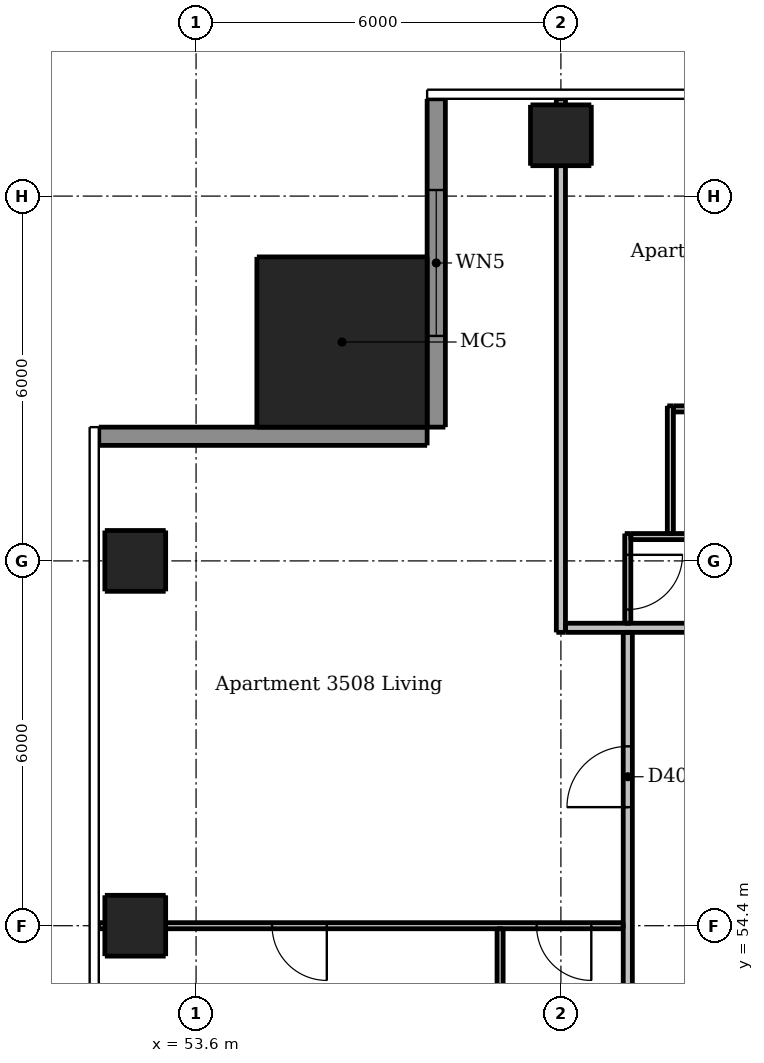
"""IFC4 building model, lengths in metres.
Left out: names, types, materials, properties, quantities, classifications, styles, units other than length and angle.
Written with IfcOpenShell. Run it as: python <this file> out.ifc"""

import sys

from ifc_helpers import new_model, si_unit, direction, frame, frame_2d, origin, origin_2d, place, context, subcontext, project, spatial, rectangle, extrude, element, fill, save


model = new_model("IFC4")
c1 = context("Model", 3, precision=1e-05, world=origin(), true_north=direction((0.0, 1.0)))
c2 = subcontext(c1, "Body", "Model", "MODEL_VIEW")
j1 = project(units=[si_unit("LENGTHUNIT", "METRE"), si_unit("PLANEANGLEUNIT", "RADIAN")], contexts=[c1])
p1 = place(None, origin())
s1 = spatial("IfcSite", under=j1, at=p1, CompositionType="ELEMENT")
p2 = place(p1, origin())
s2 = spatial("IfcBuilding", under=s1, at=p2, CompositionType="ELEMENT")
p3 = place(p2, frame((0.0, 0.0, 133.9)))
s3 = spatial("IfcBuildingStorey", under=s2, at=p3, CompositionType="ELEMENT", Elevation=133.9)
for number, where, z_axis, x_axis in (
    (1, (59.6, 67.4, 0.0), (0.0, 0.0, 1.0), (1.0, 0.0, 0.0)),
    (2, (52.6, 54.4, 0.0), (0.0, 0.0, 1.0), (1.0, 0.0, 0.0)),
    (3, (52.6, 60.4, 0.0), (0.0, 0.0, 1.0), (1.0, 0.0, 0.0)),
):
    element("IfcColumn", number, at=place(p3, frame(where, z_axis=z_axis, x_axis=x_axis)), inside=s3, PredefinedType="COLUMN", context=c2, shape_type="SweptSolid", body=[
        extrude(rectangle(XDim=1.0, YDim=1.0, at=origin_2d()), origin(), (0.0, 0.0, 1.0), 3.05),
    ])
p4 = place(p3, frame((56.0, 64.0, 0.0), z_axis=(0.0, 0.0, 1.0), x_axis=(1.0, 0.0, 0.0)))
e4 = element("IfcColumn", 4, at=p4, inside=s3, PredefinedType="COLUMN", context=c2, shape_type="SweptSolid", body=[
    extrude(rectangle(XDim=2.8, YDim=2.8, at=origin_2d()), origin(), (0.0, 0.0, 1.0), 3.3),
])
p5 = place(p3, frame((57.55, 68.0, 0.0), z_axis=(0.0, 0.0, 1.0), x_axis=(0.0, -1.0, 0.0)))
e5 = element("IfcWall", 5, at=p5, inside=s3, PredefinedType="SOLIDWALL", context=c2, shape_type="SweptSolid", body=[
    extrude(rectangle(XDim=5.4, YDim=0.3, at=frame_2d((2.7, 0.0))), origin(), (0.0, 0.0, 1.0), 3.05),
])
p6 = place(p5, frame((1.5, 0.0, 0.15)))
e6 = element("IfcOpeningElement", 6, at=p6, cuts=e5, PredefinedType="OPENING", context=c2, shape_type="SweptSolid", body=[
    extrude(rectangle(XDim=2.4, YDim=2.1, at=frame_2d((1.2, 1.05))), frame((0.0, 0.16, 0.0), z_axis=(0.0, -1.0, 0.0), x_axis=(1.0, 0.0, 0.0)), (0.0, 0.0, 1.0), 0.32),
])
p7 = place(p3, frame((57.4, 62.45, 0.0), z_axis=(0.0, 0.0, 1.0), x_axis=(-1.0, 0.0, 0.0)))
e7 = element("IfcWall", 7, at=p7, inside=s3, PredefinedType="SOLIDWALL", context=c2, shape_type="SweptSolid", body=[
    extrude(rectangle(XDim=5.4, YDim=0.3, at=frame_2d((2.7, 0.0))), origin(), (0.0, 0.0, 1.0), 3.05),
])
p8 = place(p3, frame((58.6, 54.35, 0.0), z_axis=(0.0, 0.0, 1.0), x_axis=(0.0, -1.0, 0.0)))
e8 = element("IfcWall", 8, at=p8, inside=s3, PredefinedType="PARTITIONING", context=c2, shape_type="SweptSolid", body=[
    extrude(rectangle(XDim=5.875, YDim=0.1, at=frame_2d((2.938, 0.0))), origin(), (0.0, 0.0, 1.0), 3.05),
])
p9 = place(p8, frame((3.75, 0.0, 0.0)))
e9 = element("IfcOpeningElement", 9, at=p9, cuts=e8, PredefinedType="OPENING", context=c2, shape_type="SweptSolid", body=[
    extrude(rectangle(XDim=0.8, YDim=2.1, at=frame_2d((0.4, 1.05))), frame((0.0, 0.06, 0.0), z_axis=(0.0, -1.0, 0.0), x_axis=(1.0, 0.0, 0.0)), (0.0, 0.0, 1.0), 0.12),
])
p10 = place(p3, frame((60.7, 60.85, 0.0), z_axis=(0.0, 0.0, 1.0), x_axis=(0.0, -1.0, 0.0)))
e10 = element("IfcWall", 10, at=p10, inside=s3, PredefinedType="PARTITIONING", context=c2, shape_type="SweptSolid", body=[
    extrude(rectangle(XDim=1.475, YDim=0.1, at=frame_2d((0.738, 0.0))), origin(), (0.0, 0.0, 1.0), 3.05),
])
p11 = place(p10, frame((0.35, 0.0, 0.0)))
e11 = element("IfcOpeningElement", 11, at=p11, cuts=e10, PredefinedType="OPENING", context=c2, shape_type="SweptSolid", body=[
    extrude(rectangle(XDim=0.9, YDim=2.1, at=frame_2d((0.45, 1.05))), frame((0.0, 0.06, 0.0), z_axis=(0.0, -1.0, 0.0), x_axis=(1.0, 0.0, 0.0)), (0.0, 0.0, 1.0), 0.12),
])
p12 = place(p3, frame((61.4, 60.85, 0.0), z_axis=(0.0, 0.0, 1.0), x_axis=(0.0, 1.0, 0.0)))
e12 = element("IfcWall", 12, at=p12, inside=s3, PredefinedType="PARTITIONING", context=c2, shape_type="SweptSolid", body=[
    extrude(rectangle(XDim=2.1, YDim=0.1, at=frame_2d((1.05, 0.0))), origin(), (0.0, 0.0, 1.0), 3.05),
])
p13 = place(p3, frame((61.45, 62.9, 0.0), z_axis=(0.0, 0.0, 1.0), x_axis=(1.0, 0.0, 0.0)))
e13 = element("IfcWall", 13, at=p13, inside=s3, PredefinedType="PARTITIONING", context=c2, shape_type="SweptSolid", body=[
    extrude(rectangle(XDim=6.5, YDim=0.1, at=frame_2d((3.25, 0.0))), origin(), (0.0, 0.0, 1.0), 3.05),
])
p14 = place(p3, frame((60.75, 60.8, 0.0), z_axis=(0.0, 0.0, 1.0), x_axis=(1.0, 0.0, 0.0)))
e14 = element("IfcWall", 14, at=p14, inside=s3, PredefinedType="PARTITIONING", context=c2, shape_type="SweptSolid", body=[
    extrude(rectangle(XDim=16.775, YDim=0.1, at=frame_2d((8.387, 0.0))), origin(), (0.0, 0.0, 1.0), 3.05),
])
p15 = place(p14, frame((3.2, 0.0, 0.0)))
e15 = element("IfcOpeningElement", 15, at=p15, cuts=e14, PredefinedType="OPENING", context=c2, shape_type="SweptSolid", body=[
    extrude(rectangle(XDim=0.9, YDim=2.1, at=frame_2d((0.45, 1.05))), frame((0.0, 0.06, 0.0), z_axis=(0.0, -1.0, 0.0), x_axis=(1.0, 0.0, 0.0)), (0.0, 0.0, 1.0), 0.12),
])
p16 = place(p14, frame((1.1, 0.0, 0.0)))
e16 = element("IfcOpeningElement", 16, at=p16, cuts=e14, PredefinedType="OPENING", context=c2, shape_type="SweptSolid", body=[
    extrude(rectangle(XDim=0.9, YDim=2.1, at=frame_2d((0.45, 1.05))), frame((0.0, 0.06, 0.0), z_axis=(0.0, -1.0, 0.0), x_axis=(1.0, 0.0, 0.0)), (0.0, 0.0, 1.0), 0.12),
])
p17 = place(p14, frame((8.6, 0.0, 0.0)))
e17 = element("IfcOpeningElement", 17, at=p17, cuts=e14, PredefinedType="OPENING", context=c2, shape_type="SweptSolid", body=[
    extrude(rectangle(XDim=0.9, YDim=2.1, at=frame_2d((0.45, 1.05))), frame((0.0, 0.06, 0.0), z_axis=(0.0, -1.0, 0.0), x_axis=(1.0, 0.0, 0.0)), (0.0, 0.0, 1.0), 0.12),
])
p18 = place(p14, frame((14.6, 0.0, 0.0)))
e18 = element("IfcOpeningElement", 18, at=p18, cuts=e14, PredefinedType="OPENING", context=c2, shape_type="SweptSolid", body=[
    extrude(rectangle(XDim=0.9, YDim=2.1, at=frame_2d((0.45, 1.05))), frame((0.0, 0.06, 0.0), z_axis=(0.0, -1.0, 0.0), x_axis=(1.0, 0.0, 0.0)), (0.0, 0.0, 1.0), 0.12),
])
p19 = place(p14, frame((5.65, 0.0, 0.0)))
e19 = element("IfcOpeningElement", 19, at=p19, cuts=e14, PredefinedType="OPENING", context=c2, shape_type="SweptSolid", body=[
    extrude(rectangle(XDim=0.8, YDim=2.1, at=frame_2d((0.4, 1.05))), frame((0.0, 0.06, 0.0), z_axis=(0.0, -1.0, 0.0), x_axis=(1.0, 0.0, 0.0)), (0.0, 0.0, 1.0), 0.12),
])
p20 = place(p14, frame((11.65, 0.0, 0.0)))
e20 = element("IfcOpeningElement", 20, at=p20, cuts=e14, PredefinedType="OPENING", context=c2, shape_type="SweptSolid", body=[
    extrude(rectangle(XDim=0.8, YDim=2.1, at=frame_2d((0.4, 1.05))), frame((0.0, 0.06, 0.0), z_axis=(0.0, -1.0, 0.0), x_axis=(1.0, 0.0, 0.0)), (0.0, 0.0, 1.0), 0.12),
])
p21 = place(p3, frame((60.625, 54.4, 0.0), z_axis=(0.0, 0.0, 1.0), x_axis=(-1.0, 0.0, 0.0)))
e21 = element("IfcWall", 21, at=p21, inside=s3, PredefinedType="PARTITIONING", context=c2, shape_type="SweptSolid", body=[
    extrude(rectangle(XDim=8.625, YDim=0.1, at=frame_2d((4.312, 0.0))), origin(), (0.0, 0.0, 1.0), 2.516),
])
p22 = place(p21, frame((0.525, 0.0, 0.0)))
e22 = element("IfcOpeningElement", 22, at=p22, cuts=e21, PredefinedType="OPENING", context=c2, shape_type="SweptSolid", body=[
    extrude(rectangle(XDim=0.9, YDim=2.1, at=frame_2d((0.45, 1.05))), frame((0.0, 0.06, 0.0), z_axis=(0.0, -1.0, 0.0), x_axis=(1.0, 0.0, 0.0)), (0.0, 0.0, 1.0), 0.12),
])
p23 = place(p21, frame((4.875, 0.0, 0.0)))
e23 = element("IfcOpeningElement", 23, at=p23, cuts=e21, PredefinedType="OPENING", context=c2, shape_type="SweptSolid", body=[
    extrude(rectangle(XDim=0.9, YDim=2.1, at=frame_2d((0.45, 1.05))), frame((0.0, 0.06, 0.0), z_axis=(0.0, -1.0, 0.0), x_axis=(1.0, 0.0, 0.0)), (0.0, 0.0, 1.0), 0.12),
])
p24 = place(p3, frame((59.6, 59.225, 0.0), z_axis=(0.0, 0.0, 1.0), x_axis=(0.0, 1.0, 0.0)))
e24 = element("IfcWall", 24, at=p24, inside=s3, PredefinedType="PARTITIONING", context=c2, shape_type="SweptSolid", body=[
    extrude(rectangle(XDim=8.775, YDim=0.15, at=frame_2d((4.387, 0.0))), origin(), (0.0, 0.0, 1.0), 2.51),
])
p25 = place(p3, frame((60.7, 30.325, 0.0), z_axis=(0.0, 0.0, 1.0), x_axis=(0.0, 1.0, 0.0)))
e25 = element("IfcWall", 25, at=p25, inside=s3, PredefinedType="PARTITIONING", context=c2, shape_type="SweptSolid", body=[
    extrude(rectangle(XDim=28.9, YDim=0.15, at=frame_2d((14.45, 0.0))), origin(), (0.0, 0.0, 1.0), 3.05),
])
p26 = place(p25, frame((9.225, 0.0, 0.0)))
e26 = element("IfcOpeningElement", 26, at=p26, cuts=e25, PredefinedType="OPENING", context=c2, shape_type="SweptSolid", body=[
    extrude(rectangle(XDim=1.0, YDim=2.1, at=frame_2d((0.5, 1.05))), frame((0.0, 0.085, 0.0), z_axis=(0.0, -1.0, 0.0), x_axis=(1.0, 0.0, 0.0)), (0.0, 0.0, 1.0), 0.17),
])
p27 = place(p25, frame((26.025, 0.0, 0.0)))
e27 = element("IfcOpeningElement", 27, at=p27, cuts=e25, PredefinedType="OPENING", context=c2, shape_type="SweptSolid", body=[
    extrude(rectangle(XDim=1.0, YDim=2.1, at=frame_2d((0.5, 1.05))), frame((0.0, 0.085, 0.0), z_axis=(0.0, -1.0, 0.0), x_axis=(1.0, 0.0, 0.0)), (0.0, 0.0, 1.0), 0.17),
])
p28 = place(p3, frame((59.675, 59.3, 0.0), z_axis=(0.0, 0.0, 1.0), x_axis=(1.0, 0.0, 0.0)))
e28 = element("IfcWall", 28, at=p28, inside=s3, PredefinedType="PARTITIONING", context=c2, shape_type="SweptSolid", body=[
    extrude(rectangle(XDim=28.55, YDim=0.15, at=frame_2d((14.275, 0.0))), origin(), (0.0, 0.0, 1.0), 3.05),
])
p29 = place(p28, frame((8.975, 0.0, 0.0)))
e29 = element("IfcOpeningElement", 29, at=p29, cuts=e28, PredefinedType="OPENING", context=c2, shape_type="SweptSolid", body=[
    extrude(rectangle(XDim=1.0, YDim=2.1, at=frame_2d((0.5, 1.05))), frame((0.0, 0.085, 0.0), z_axis=(0.0, -1.0, 0.0), x_axis=(1.0, 0.0, 0.0)), (0.0, 0.0, 1.0), 0.17),
])
p30 = place(p28, frame((25.775, 0.0, 0.0)))
e30 = element("IfcOpeningElement", 30, at=p30, cuts=e28, PredefinedType="OPENING", context=c2, shape_type="SweptSolid", body=[
    extrude(rectangle(XDim=1.0, YDim=2.1, at=frame_2d((0.5, 1.05))), frame((0.0, 0.085, 0.0), z_axis=(0.0, -1.0, 0.0), x_axis=(1.0, 0.0, 0.0)), (0.0, 0.0, 1.0), 0.17),
])
p31 = place(p6, origin())
e31 = element("IfcWindow", 31, at=p31, inside=s3, PartitioningType="DOUBLE_PANEL_VERTICAL", PredefinedType="WINDOW", context=c2, shape_type="SweptSolid", body=[
    extrude(rectangle(XDim=2.4, YDim=2.1, at=frame_2d((1.2, 1.05))), frame((0.0, 0.03, 0.0), z_axis=(0.0, -1.0, 0.0), x_axis=(1.0, 0.0, 0.0)), (0.0, 0.0, 1.0), 0.06),
])
fill(e6, e31)
p32 = place(p11, origin())
e32 = element("IfcDoor", 32, at=p32, inside=s3, OperationType="SINGLE_SWING_LEFT", PredefinedType="DOOR", context=c2, shape_type="SweptSolid", body=[
    extrude(rectangle(XDim=0.9, YDim=2.1, at=frame_2d((0.45, 1.05))), frame((0.0, 0.025, 0.0), z_axis=(0.0, -1.0, 0.0), x_axis=(1.0, 0.0, 0.0)), (0.0, 0.0, 1.0), 0.05),
])
fill(e11, e32)
p33 = place(p27, origin())
e33 = element("IfcDoor", 33, at=p33, inside=s3, OperationType="SINGLE_SWING_LEFT", PredefinedType="DOOR", context=c2, shape_type="SweptSolid", body=[
    extrude(rectangle(XDim=1.0, YDim=2.1, at=frame_2d((0.5, 1.05))), frame((0.0, 0.025, 0.0), z_axis=(0.0, -1.0, 0.0), x_axis=(1.0, 0.0, 0.0)), (0.0, 0.0, 1.0), 0.05),
])
fill(e27, e33)
p34 = place(p22, origin())
e34 = element("IfcDoor", 34, at=p34, inside=s3, OperationType="SINGLE_SWING_LEFT", PredefinedType="DOOR", context=c2, shape_type="SweptSolid", body=[
    extrude(rectangle(XDim=0.9, YDim=2.1, at=frame_2d((0.45, 1.05))), frame((0.0, 0.025, 0.0), z_axis=(0.0, -1.0, 0.0), x_axis=(1.0, 0.0, 0.0)), (0.0, 0.0, 1.0), 0.05),
])
fill(e22, e34)
p35 = place(p23, origin())
e35 = element("IfcDoor", 35, at=p35, inside=s3, OperationType="SINGLE_SWING_LEFT", PredefinedType="DOOR", context=c2, shape_type="SweptSolid", body=[
    extrude(rectangle(XDim=0.9, YDim=2.1, at=frame_2d((0.45, 1.05))), frame((0.0, 0.025, 0.0), z_axis=(0.0, -1.0, 0.0), x_axis=(1.0, 0.0, 0.0)), (0.0, 0.0, 1.0), 0.05),
])
fill(e23, e35)
save(model, sys.argv[1])
